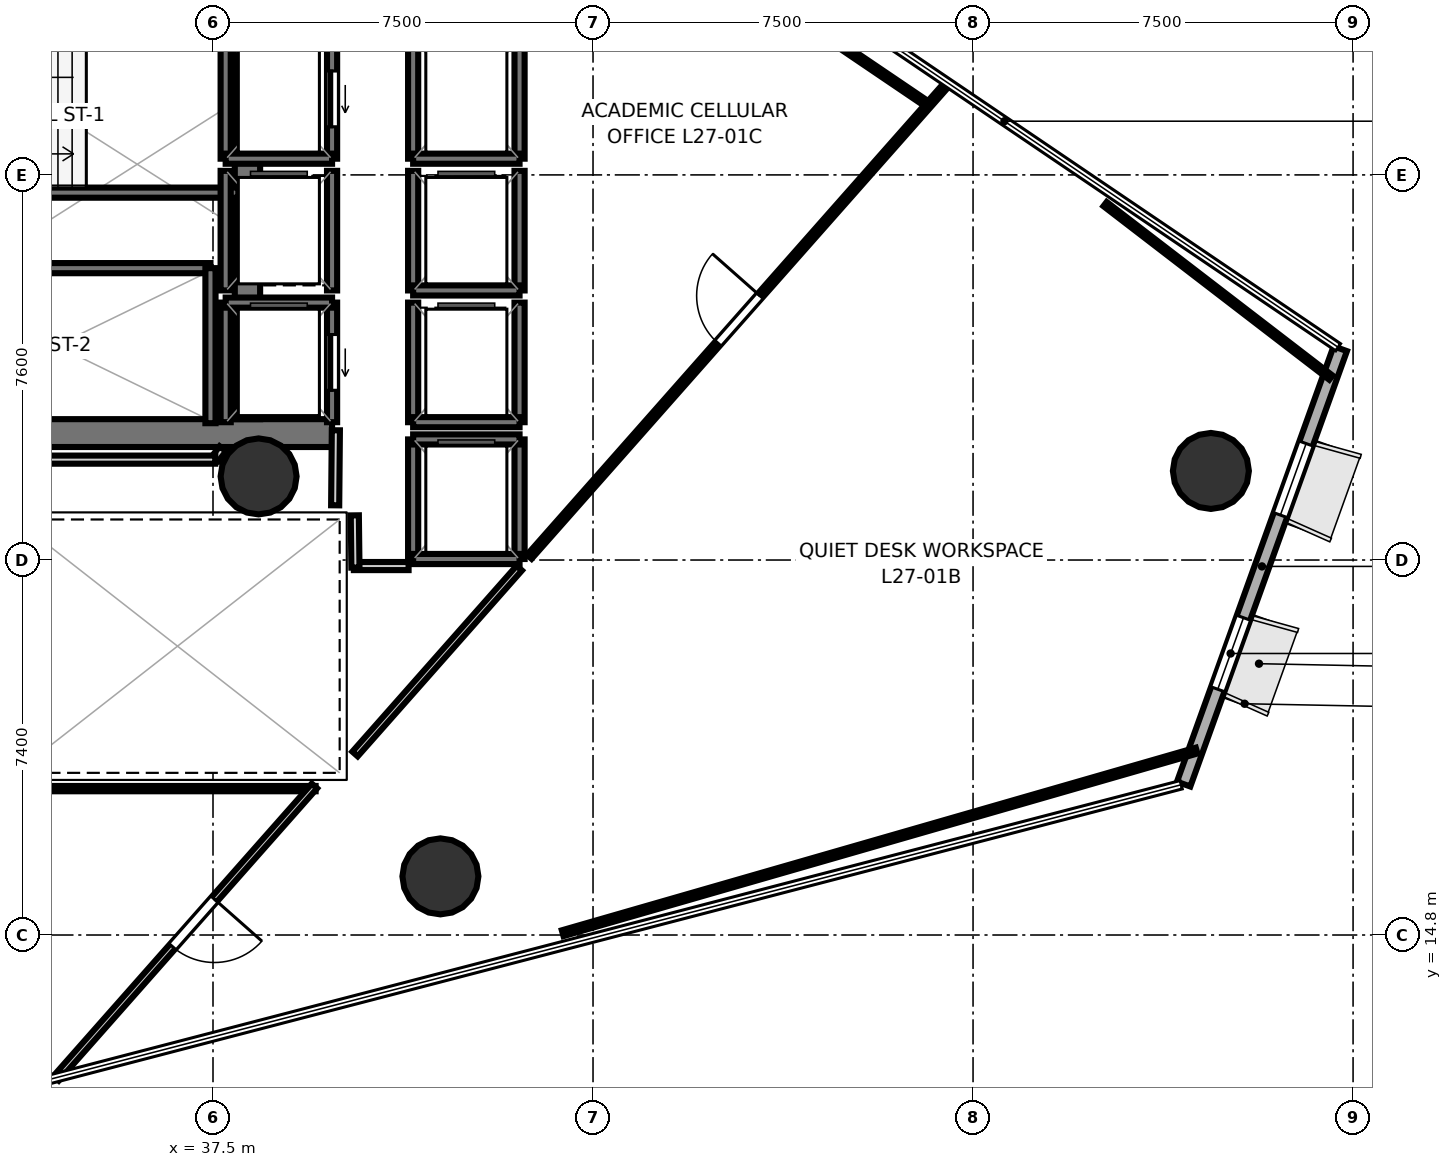
"""IFC4 building model, lengths in metres.
Left out: names, types, materials, properties, quantities, classifications, styles, units other than length and angle.
Written with IfcOpenShell. Run it as: python <this file> out.ifc"""

import sys

from ifc_helpers import new_model, si_unit, direction, frame, frame_2d, origin, origin_2d, place, context, subcontext, project, spatial, rectangle, hollow_circle, extrude, element, fill, save


model = new_model("IFC4")
c1 = context("Model", 3, precision=1e-05, world=origin(), true_north=direction((0.0, 1.0)))
c2 = subcontext(c1, "Body", "Model", "MODEL_VIEW")
j1 = project(units=[si_unit("LENGTHUNIT", "METRE"), si_unit("PLANEANGLEUNIT", "RADIAN")], contexts=[c1])
p1 = place(None, origin())
s1 = spatial("IfcSite", under=j1, at=p1, CompositionType="ELEMENT")
p2 = place(p1, origin())
s2 = spatial("IfcBuilding", under=s1, at=p2, CompositionType="ELEMENT")
p3 = place(p2, frame((0.0, 0.0, 108.9)))
s3 = spatial("IfcBuildingStorey", under=s2, at=p3, CompositionType="ELEMENT", Elevation=108.9)
p4 = place(p3, frame((29.23, 24.705, 0.0), z_axis=(0.0, 0.0, 1.0), x_axis=(1.0, 0.0, 0.0)))
e1 = element("IfcWall", 1, at=p4, inside=s3, PredefinedType="SHEAR", context=c2, shape_type="SweptSolid", body=[
    extrude(rectangle(XDim=10.62, YDim=0.55, at=frame_2d((5.31, 0.0))), origin(), (0.0, 0.0, 1.0), 3.52),
])
p5 = place(p4, frame((0.795, 0.0, 0.0)))
e2 = element("IfcOpeningElement", 2, at=p5, cuts=e1, PredefinedType="OPENING", context=c2, shape_type="SweptSolid", body=[
    extrude(rectangle(XDim=1.25, YDim=2.15, at=frame_2d((0.625, 1.075))), frame((0.0, 0.285, 0.0), z_axis=(0.0, -1.0, 0.0), x_axis=(1.0, 0.0, 0.0)), (0.0, 0.0, 1.0), 0.57),
])
p6 = place(p3, frame((38.18, 24.98, 0.0), z_axis=(0.0, 0.0, 1.0), x_axis=(0.0, 1.0, 0.0)))
e3 = element("IfcWall", 3, at=p6, inside=s3, PredefinedType="SHEAR", context=c2, shape_type="SweptSolid", body=[
    extrude(rectangle(XDim=7.44, YDim=0.5, at=frame_2d((3.72, 0.0))), origin(), (0.0, 0.0, 1.0), 3.52),
])
for number, where, z_axis, x_axis in (
    (4, (38.4, 23.85, 0.0), (0.0, 0.0, 1.0), (1.0, 0.0, 0.0)),
    (5, (57.194, 23.958, 0.0), (0.0, 0.0, 1.0), (1.0, 0.0, 0.0)),
    (6, (41.988, 15.957, 0.0), (0.0, 0.0, 1.0), (1.0, 0.0, 0.0)),
):
    element("IfcColumn", number, at=place(p3, frame(where, z_axis=z_axis, x_axis=x_axis)), inside=s3, PredefinedType="COLUMN", context=c2, shape_type="SweptSolid", body=[
        extrude(hollow_circle(Radius=0.75, WallThickness=0.036, at=origin_2d()), origin(), (0.0, 0.0, 1.0), 3.7),
    ])
p7 = place(p3, frame((56.656, 17.778, 0.0), z_axis=(0.0, 0.0, 1.0), x_axis=(0.338454364394, 0.940982807081, 0.0)))
e7 = element("IfcWall", 7, at=p7, inside=s3, PredefinedType="SOLIDWALL", context=c2, shape_type="SweptSolid", body=[
    extrude(rectangle(XDim=9.131, YDim=0.28, at=frame_2d((4.566, 0.0))), origin(), (0.0, 0.0, 1.0), 3.52),
])
p8 = place(p7, frame((1.99, 0.0, 0.85)))
e8 = element("IfcOpeningElement", 8, at=p8, cuts=e7, PredefinedType="OPENING", context=c2, shape_type="SweptSolid", body=[
    extrude(rectangle(XDim=1.5, YDim=2.1, at=frame_2d((0.75, 1.05))), frame((0.0, 0.15, 0.0), z_axis=(0.0, -1.0, 0.0), x_axis=(1.0, 0.0, 0.0)), (0.0, 0.0, 1.0), 0.3),
])
p9 = place(p7, frame((5.642, 0.0, 0.85)))
e9 = element("IfcOpeningElement", 9, at=p9, cuts=e7, PredefinedType="OPENING", context=c2, shape_type="SweptSolid", body=[
    extrude(rectangle(XDim=1.5, YDim=2.1, at=frame_2d((0.75, 1.05))), frame((0.0, 0.15, 0.0), z_axis=(0.0, -1.0, 0.0), x_axis=(1.0, 0.0, 0.0)), (0.0, 0.0, 1.0), 0.3),
])
p10 = place(p3, frame((29.7, 29.45, 0.0), z_axis=(0.0, 0.0, 1.0), x_axis=(1.0, 0.0, 0.0)))
e10 = element("IfcWall", 10, at=p10, inside=s3, PredefinedType="SOLIDWALL", context=c2, shape_type="SweptSolid", body=[
    extrude(rectangle(XDim=8.3, YDim=0.2, at=frame_2d((4.15, 0.0))), origin(), (0.0, 0.0, 1.0), 3.52),
])
p11 = place(p3, frame((29.7, 27.96, 0.0), z_axis=(0.0, 0.0, 1.0), x_axis=(1.0, 0.0, 0.0)))
e11 = element("IfcWall", 11, at=p11, inside=s3, PredefinedType="SOLIDWALL", context=c2, shape_type="SweptSolid", body=[
    extrude(rectangle(XDim=7.75, YDim=0.2, at=frame_2d((3.875, 0.0))), origin(), (0.0, 0.0, 1.0), 3.52),
])
p12 = place(p3, frame((37.45, 24.9, 0.0), z_axis=(0.0, 0.0, 1.0), x_axis=(0.0, 1.0, 0.0)))
e12 = element("IfcWall", 12, at=p12, inside=s3, PredefinedType="SOLIDWALL", context=c2, shape_type="SweptSolid", body=[
    extrude(rectangle(XDim=3.06, YDim=0.2, at=frame_2d((1.53, 0.0))), origin(), (0.0, 0.0, 1.0), 3.52),
])
p13 = place(p3, frame((39.85, 30.12, 0.0), z_axis=(0.0, 0.0, 1.0), x_axis=(0.0, 1.0, 0.0)))
e13 = element("IfcWall", 13, at=p13, inside=s3, PredefinedType="SOLIDWALL", context=c2, shape_type="SweptSolid", body=[
    extrude(rectangle(XDim=2.36, YDim=0.2, at=frame_2d((1.18, 0.0))), origin(), (0.0, 0.0, 1.0), 3.52),
])
p14 = place(p13, frame((0.63, 0.0, 0.0)))
e14 = element("IfcOpeningElement", 14, at=p14, cuts=e13, PredefinedType="OPENING", context=c2, shape_type="SweptSolid", body=[
    extrude(rectangle(XDim=1.1, YDim=2.15, at=frame_2d((0.55, 1.075))), frame((0.0, 0.11, 0.0), z_axis=(0.0, -1.0, 0.0), x_axis=(1.0, 0.0, 0.0)), (0.0, 0.0, 1.0), 0.22),
])
p15 = place(p3, frame((37.75, 30.12, 0.0), z_axis=(0.0, 0.0, 1.0), x_axis=(0.0, 1.0, 0.0)))
e15 = element("IfcWall", 15, at=p15, inside=s3, PredefinedType="SOLIDWALL", context=c2, shape_type="SweptSolid", body=[
    extrude(rectangle(XDim=2.36, YDim=0.2, at=frame_2d((1.18, 0.0))), origin(), (0.0, 0.0, 1.0), 3.52),
])
p16 = place(p3, frame((37.75, 30.12, 0.0), z_axis=(0.0, 0.0, 1.0), x_axis=(1.0, 0.0, 0.0)))
e16 = element("IfcWall", 16, at=p16, inside=s3, PredefinedType="SOLIDWALL", context=c2, shape_type="SweptSolid", body=[
    extrude(rectangle(XDim=2.1, YDim=0.2, at=frame_2d((1.05, 0.0))), origin(), (0.0, 0.0, 1.0), 3.52),
])
p17 = place(p3, frame((39.85, 24.92, 0.0), z_axis=(0.0, 0.0, 1.0), x_axis=(0.0, 1.0, 0.0)))
e17 = element("IfcWall", 17, at=p17, inside=s3, PredefinedType="SOLIDWALL", context=c2, shape_type="SweptSolid", body=[
    extrude(rectangle(XDim=2.36, YDim=0.2, at=frame_2d((1.18, 0.0))), origin(), (0.0, 0.0, 1.0), 3.52),
])
p18 = place(p17, frame((0.63, 0.0, 0.0)))
e18 = element("IfcOpeningElement", 18, at=p18, cuts=e17, PredefinedType="OPENING", context=c2, shape_type="SweptSolid", body=[
    extrude(rectangle(XDim=1.1, YDim=2.15, at=frame_2d((0.55, 1.075))), frame((0.0, 0.11, 0.0), z_axis=(0.0, -1.0, 0.0), x_axis=(1.0, 0.0, 0.0)), (0.0, 0.0, 1.0), 0.22),
])
p19 = place(p3, frame((37.75, 24.92, 0.0), z_axis=(0.0, 0.0, 1.0), x_axis=(0.0, 1.0, 0.0)))
e19 = element("IfcWall", 19, at=p19, inside=s3, PredefinedType="SOLIDWALL", context=c2, shape_type="SweptSolid", body=[
    extrude(rectangle(XDim=2.36, YDim=0.2, at=frame_2d((1.18, 0.0))), origin(), (0.0, 0.0, 1.0), 3.52),
])
p20 = place(p3, frame((37.75, 27.28, 0.0), z_axis=(0.0, 0.0, 1.0), x_axis=(1.0, 0.0, 0.0)))
e20 = element("IfcWall", 20, at=p20, inside=s3, PredefinedType="SOLIDWALL", context=c2, shape_type="SweptSolid", body=[
    extrude(rectangle(XDim=2.1, YDim=0.2, at=frame_2d((1.05, 0.0))), origin(), (0.0, 0.0, 1.0), 3.52),
])
for number, where, z_axis, x_axis in (
    (21, (43.55, 30.12, 0.0), (0.0, 0.0, 1.0), (0.0, 1.0, 0.0)),
    (22, (41.45, 30.12, 0.0), (0.0, 0.0, 1.0), (0.0, 1.0, 0.0)),
):
    element("IfcWall", number, at=place(p3, frame(where, z_axis=z_axis, x_axis=x_axis)), inside=s3, PredefinedType="SOLIDWALL", context=c2, shape_type="SweptSolid", body=[
        extrude(rectangle(XDim=2.36, YDim=0.2, at=frame_2d((1.18, 0.0))), origin(), (0.0, 0.0, 1.0), 3.52),
    ])
p21 = place(p3, frame((41.45, 30.12, 0.0), z_axis=(0.0, 0.0, 1.0), x_axis=(1.0, 0.0, 0.0)))
e23 = element("IfcWall", 23, at=p21, inside=s3, PredefinedType="SOLIDWALL", context=c2, shape_type="SweptSolid", body=[
    extrude(rectangle(XDim=2.1, YDim=0.2, at=frame_2d((1.05, 0.0))), origin(), (0.0, 0.0, 1.0), 3.52),
])
for number, where, z_axis, x_axis in (
    (24, (43.55, 27.52, 0.0), (0.0, 0.0, 1.0), (0.0, 1.0, 0.0)),
    (25, (41.45, 27.52, 0.0), (0.0, 0.0, 1.0), (0.0, 1.0, 0.0)),
):
    element("IfcWall", number, at=place(p3, frame(where, z_axis=z_axis, x_axis=x_axis)), inside=s3, PredefinedType="SOLIDWALL", context=c2, shape_type="SweptSolid", body=[
        extrude(rectangle(XDim=2.36, YDim=0.2, at=frame_2d((1.18, 0.0))), origin(), (0.0, 0.0, 1.0), 3.52),
    ])
p22 = place(p3, frame((41.45, 27.52, 0.0), z_axis=(0.0, 0.0, 1.0), x_axis=(1.0, 0.0, 0.0)))
e26 = element("IfcWall", 26, at=p22, inside=s3, PredefinedType="SOLIDWALL", context=c2, shape_type="SweptSolid", body=[
    extrude(rectangle(XDim=2.1, YDim=0.2, at=frame_2d((1.05, 0.0))), origin(), (0.0, 0.0, 1.0), 3.52),
])
for number, where, z_axis, x_axis in (
    (27, (43.55, 24.92, 0.0), (0.0, 0.0, 1.0), (0.0, 1.0, 0.0)),
    (28, (41.45, 24.92, 0.0), (0.0, 0.0, 1.0), (0.0, 1.0, 0.0)),
):
    element("IfcWall", number, at=place(p3, frame(where, z_axis=z_axis, x_axis=x_axis)), inside=s3, PredefinedType="SOLIDWALL", context=c2, shape_type="SweptSolid", body=[
        extrude(rectangle(XDim=2.36, YDim=0.2, at=frame_2d((1.18, 0.0))), origin(), (0.0, 0.0, 1.0), 3.52),
    ])
p23 = place(p3, frame((41.45, 24.92, 0.0), z_axis=(0.0, 0.0, 1.0), x_axis=(1.0, 0.0, 0.0)))
e29 = element("IfcWall", 29, at=p23, inside=s3, PredefinedType="SOLIDWALL", context=c2, shape_type="SweptSolid", body=[
    extrude(rectangle(XDim=2.1, YDim=0.2, at=frame_2d((1.05, 0.0))), origin(), (0.0, 0.0, 1.0), 3.52),
])
for number, where, z_axis, x_axis in (
    (30, (39.85, 27.52, 0.0), (0.0, 0.0, 1.0), (0.0, 1.0, 0.0)),
    (31, (37.75, 27.52, 0.0), (0.0, 0.0, 1.0), (0.0, 1.0, 0.0)),
):
    element("IfcWall", number, at=place(p3, frame(where, z_axis=z_axis, x_axis=x_axis)), inside=s3, PredefinedType="SOLIDWALL", context=c2, shape_type="SweptSolid", body=[
        extrude(rectangle(XDim=2.36, YDim=0.2, at=frame_2d((1.18, 0.0))), origin(), (0.0, 0.0, 1.0), 3.52),
    ])
for number, where, z_axis, x_axis in (
    (32, (43.55, 22.22, 0.0), (0.0, 0.0, 1.0), (0.0, 1.0, 0.0)),
    (33, (41.45, 22.22, 0.0), (0.0, 0.0, 1.0), (0.0, 1.0, 0.0)),
):
    element("IfcWall", number, at=place(p3, frame(where, z_axis=z_axis, x_axis=x_axis)), inside=s3, PredefinedType="SOLIDWALL", context=c2, shape_type="SweptSolid", body=[
        extrude(rectangle(XDim=2.36, YDim=0.2, at=frame_2d((1.18, 0.0))), origin(), (0.0, 0.0, 1.0), 3.52),
    ])
for number, where, z_axis, x_axis in (
    (34, (41.45, 24.58, 0.0), (0.0, 0.0, 1.0), (1.0, 0.0, 0.0)),
    (35, (41.45, 22.22, 0.0), (0.0, 0.0, 1.0), (1.0, 0.0, 0.0)),
):
    element("IfcWall", number, at=place(p3, frame(where, z_axis=z_axis, x_axis=x_axis)), inside=s3, PredefinedType="SOLIDWALL", context=c2, shape_type="SweptSolid", body=[
        extrude(rectangle(XDim=2.1, YDim=0.2, at=frame_2d((1.05, 0.0))), origin(), (0.0, 0.0, 1.0), 3.52),
    ])
p24 = place(p3, frame((41.36, 22.081, 0.0), z_axis=(0.0, 0.0, 1.0), x_axis=(-1.0, 0.0, 0.0)))
e36 = element("IfcWall", 36, at=p24, inside=s3, PredefinedType="PARTITIONING", context=c2, shape_type="SweptSolid", body=[
    extrude(rectangle(XDim=1.08, YDim=0.16, at=frame_2d((0.54, 0.0))), origin(), (0.0, 0.0, 1.0), 2.84),
])
p25 = place(p3, frame((40.311, 22.05, 0.0), z_axis=(0.0, 0.0, 1.0), x_axis=(-0.011836292006, 0.999929948642, 0.0)))
e37 = element("IfcWall", 37, at=p25, inside=s3, PredefinedType="PARTITIONING", context=c2, shape_type="SweptSolid", body=[
    extrude(rectangle(XDim=1.031, YDim=0.16, at=frame_2d((0.516, 0.0))), origin(), (0.0, 0.0, 1.0), 2.84),
])
p26 = place(p3, frame((39.911, 23.28, 0.0), z_axis=(0.0, 0.0, 1.0), x_axis=(0.009397771291, 0.999955839972, 0.0)))
e38 = element("IfcWall", 38, at=p26, inside=s3, PredefinedType="PARTITIONING", context=c2, shape_type="SweptSolid", body=[
    extrude(rectangle(XDim=1.481, YDim=0.16, at=frame_2d((0.74, 0.0))), origin(), (0.0, 0.0, 1.0), 2.84),
])
p27 = place(p3, frame((37.694, 24.396, 0.0), z_axis=(0.0, 0.0, 1.0), x_axis=(-0.607118658061, -0.794611184815, 0.0)))
e39 = element("IfcWall", 39, at=p27, inside=s3, PredefinedType="PARTITIONING", context=c2, shape_type="SweptSolid", body=[
    extrude(rectangle(XDim=0.246, YDim=0.16, at=frame_2d((0.123, 0.0))), origin(), (0.0, 0.0, 1.0), 2.84),
])
p28 = place(p3, frame((37.545, 24.181, 0.0), z_axis=(0.0, 0.0, 1.0), x_axis=(-1.0, 0.0, 0.0)))
e40 = element("IfcWall", 40, at=p28, inside=s3, PredefinedType="PARTITIONING", context=c2, shape_type="SweptSolid", body=[
    extrude(rectangle(XDim=4.015, YDim=0.16, at=frame_2d((2.007, 0.0))), origin(), (0.0, 0.0, 1.0), 2.84),
])
p29 = place(p3, frame((33.6, 17.689, 0.0), z_axis=(0.0, 0.0, 1.0), x_axis=(1.0, 0.0, 0.0)))
e41 = element("IfcWall", 41, at=p29, inside=s3, PredefinedType="PARTITIONING", context=c2, shape_type="SweptSolid", body=[
    extrude(rectangle(XDim=5.925, YDim=0.105, at=frame_2d((2.962, 0.0))), origin(), (0.0, 0.0, 1.0), 2.84),
])
p30 = place(p3, frame((39.502, 17.74, 0.0), z_axis=(0.0, 0.0, 1.0), x_axis=(-0.662230930848, -0.749299802635, 0.0)))
e42 = element("IfcWall", 42, at=p30, inside=s3, PredefinedType="PARTITIONING", context=c2, shape_type="SweptSolid", body=[
    extrude(rectangle(XDim=7.697, YDim=0.14, at=frame_2d((3.849, 0.0))), origin(), (0.0, 0.0, 1.0), 2.84),
])
p31 = place(p30, frame((2.98, 0.0, 0.0)))
e43 = element("IfcOpeningElement", 43, at=p31, cuts=e42, PredefinedType="OPENING", context=c2, shape_type="SweptSolid", body=[
    extrude(rectangle(XDim=1.25, YDim=2.2, at=frame_2d((0.625, 1.1))), frame((0.0, 0.08, 0.0), z_axis=(0.0, -1.0, 0.0), x_axis=(1.0, 0.0, 0.0)), (0.0, 0.0, 1.0), 0.16),
])
p32 = place(p3, frame((40.303, 18.372, 0.0), z_axis=(0.0, 0.0, 1.0), x_axis=(0.662221894186, 0.749307789136, 0.0)))
e44 = element("IfcWall", 44, at=p32, inside=s3, PredefinedType="PARTITIONING", context=c2, shape_type="SweptSolid", body=[
    extrude(rectangle(XDim=4.895, YDim=0.14, at=frame_2d((2.447, 0.0))), origin(), (0.0, 0.0, 1.0), 2.84),
])
p33 = place(p3, frame((43.743, 22.264, 0.0), z_axis=(0.0, 0.0, 1.0), x_axis=(0.662202897959, 0.749324577159, 0.0)))
e45 = element("IfcWall", 45, at=p33, inside=s3, PredefinedType="PARTITIONING", context=c2, shape_type="SweptSolid", body=[
    extrude(rectangle(XDim=12.498, YDim=0.12, at=frame_2d((6.249, 0.0))), origin(), (0.0, 0.0, 1.0), 2.84),
])
p34 = place(p33, frame((5.624, 0.0, 0.0)))
e46 = element("IfcOpeningElement", 46, at=p34, cuts=e45, PredefinedType="OPENING", context=c2, shape_type="SweptSolid", body=[
    extrude(rectangle(XDim=1.25, YDim=2.2, at=frame_2d((0.625, 1.1))), frame((0.0, 0.07, 0.0), z_axis=(0.0, -1.0, 0.0), x_axis=(1.0, 0.0, 0.0)), (0.0, 0.0, 1.0), 0.14),
])
p35 = place(p3, frame((55.105, 29.225, 0.0), z_axis=(0.0, 0.0, 1.0), x_axis=(0.792940356804, -0.6092992619, 0.0)))
e47 = element("IfcWall", 47, at=p35, inside=s3, PredefinedType="PARTITIONING", context=c2, shape_type="SweptSolid", body=[
    extrude(rectangle(XDim=5.621, YDim=0.105, at=frame_2d((2.811, 0.0))), origin(), (0.0, 0.0, 1.0), 2.84),
])
p36 = place(p3, frame((56.912, 18.439, 0.0), z_axis=(0.0, 0.0, 1.0), x_axis=(-0.960919467694, -0.276828063256, 0.0)))
e48 = element("IfcWall", 48, at=p36, inside=s3, PredefinedType="PARTITIONING", context=c2, shape_type="SweptSolid", body=[
    extrude(rectangle(XDim=13.02, YDim=0.12, at=frame_2d((6.51, 0.0))), origin(), (0.0, 0.0, 1.0), 2.84),
])
p37 = place(p3, frame((41.65, 37.933, 0.0), z_axis=(0.0, 0.0, 1.0), x_axis=(0.827941747022, -0.560814107827, 0.0)))
e49 = element("IfcWall", 49, at=p37, inside=s3, PredefinedType="PARTITIONING", context=c2, shape_type="SweptSolid", body=[
    extrude(rectangle(XDim=11.895, YDim=0.12, at=frame_2d((5.948, 0.0))), origin(), (0.0, 0.0, 1.0), 2.84),
])
p38 = place(p14, origin())
e50 = element("IfcDoor", 50, at=p38, inside=s3, OperationType="SLIDING_TO_LEFT", PredefinedType="DOOR", context=c2, shape_type="SweptSolid", body=[
    extrude(rectangle(XDim=1.1, YDim=2.15, at=frame_2d((0.55, 1.075))), frame((0.0, 0.025, 0.0), z_axis=(0.0, -1.0, 0.0), x_axis=(1.0, 0.0, 0.0)), (0.0, 0.0, 1.0), 0.05),
])
fill(e14, e50)
p39 = place(p18, origin())
e51 = element("IfcDoor", 51, at=p39, inside=s3, OperationType="SLIDING_TO_LEFT", PredefinedType="DOOR", context=c2, shape_type="SweptSolid", body=[
    extrude(rectangle(XDim=1.1, YDim=2.15, at=frame_2d((0.55, 1.075))), frame((0.0, 0.025, 0.0), z_axis=(0.0, -1.0, 0.0), x_axis=(1.0, 0.0, 0.0)), (0.0, 0.0, 1.0), 0.05),
])
fill(e18, e51)
p40 = place(p31, origin())
e52 = element("IfcDoor", 52, at=p40, inside=s3, OperationType="SINGLE_SWING_LEFT", PredefinedType="DOOR", context=c2, shape_type="SweptSolid", body=[
    extrude(rectangle(XDim=1.25, YDim=2.2, at=frame_2d((0.625, 1.1))), frame((0.0, 0.025, 0.0), z_axis=(0.0, -1.0, 0.0), x_axis=(1.0, 0.0, 0.0)), (0.0, 0.0, 1.0), 0.05),
])
fill(e43, e52)
p41 = place(p34, origin())
e53 = element("IfcDoor", 53, at=p41, inside=s3, OperationType="SINGLE_SWING_RIGHT", PredefinedType="DOOR", context=c2, shape_type="SweptSolid", body=[
    extrude(rectangle(XDim=1.25, YDim=2.2, at=frame_2d((0.625, 1.1))), frame((0.0, 0.025, 0.0), z_axis=(0.0, -1.0, 0.0), x_axis=(1.0, 0.0, 0.0)), (0.0, 0.0, 1.0), 0.05),
])
fill(e46, e53)
p42 = place(p8, origin())
e54 = element("IfcWindow", 54, at=p42, inside=s3, PartitioningType="SINGLE_PANEL", PredefinedType="WINDOW", context=c2, shape_type="SweptSolid", body=[
    extrude(rectangle(XDim=1.5, YDim=2.1, at=frame_2d((0.75, 1.05))), frame((0.0, 0.03, 0.0), z_axis=(0.0, -1.0, 0.0), x_axis=(1.0, 0.0, 0.0)), (0.0, 0.0, 1.0), 0.06),
])
fill(e8, e54)
p43 = place(p9, origin())
e55 = element("IfcWindow", 55, at=p43, inside=s3, PartitioningType="SINGLE_PANEL", PredefinedType="WINDOW", context=c2, shape_type="SweptSolid", body=[
    extrude(rectangle(XDim=1.5, YDim=2.1, at=frame_2d((0.75, 1.05))), frame((0.0, 0.03, 0.0), z_axis=(0.0, -1.0, 0.0), x_axis=(1.0, 0.0, 0.0)), (0.0, 0.0, 1.0), 0.06),
])
fill(e9, e55)
save(model, sys.argv[1])
